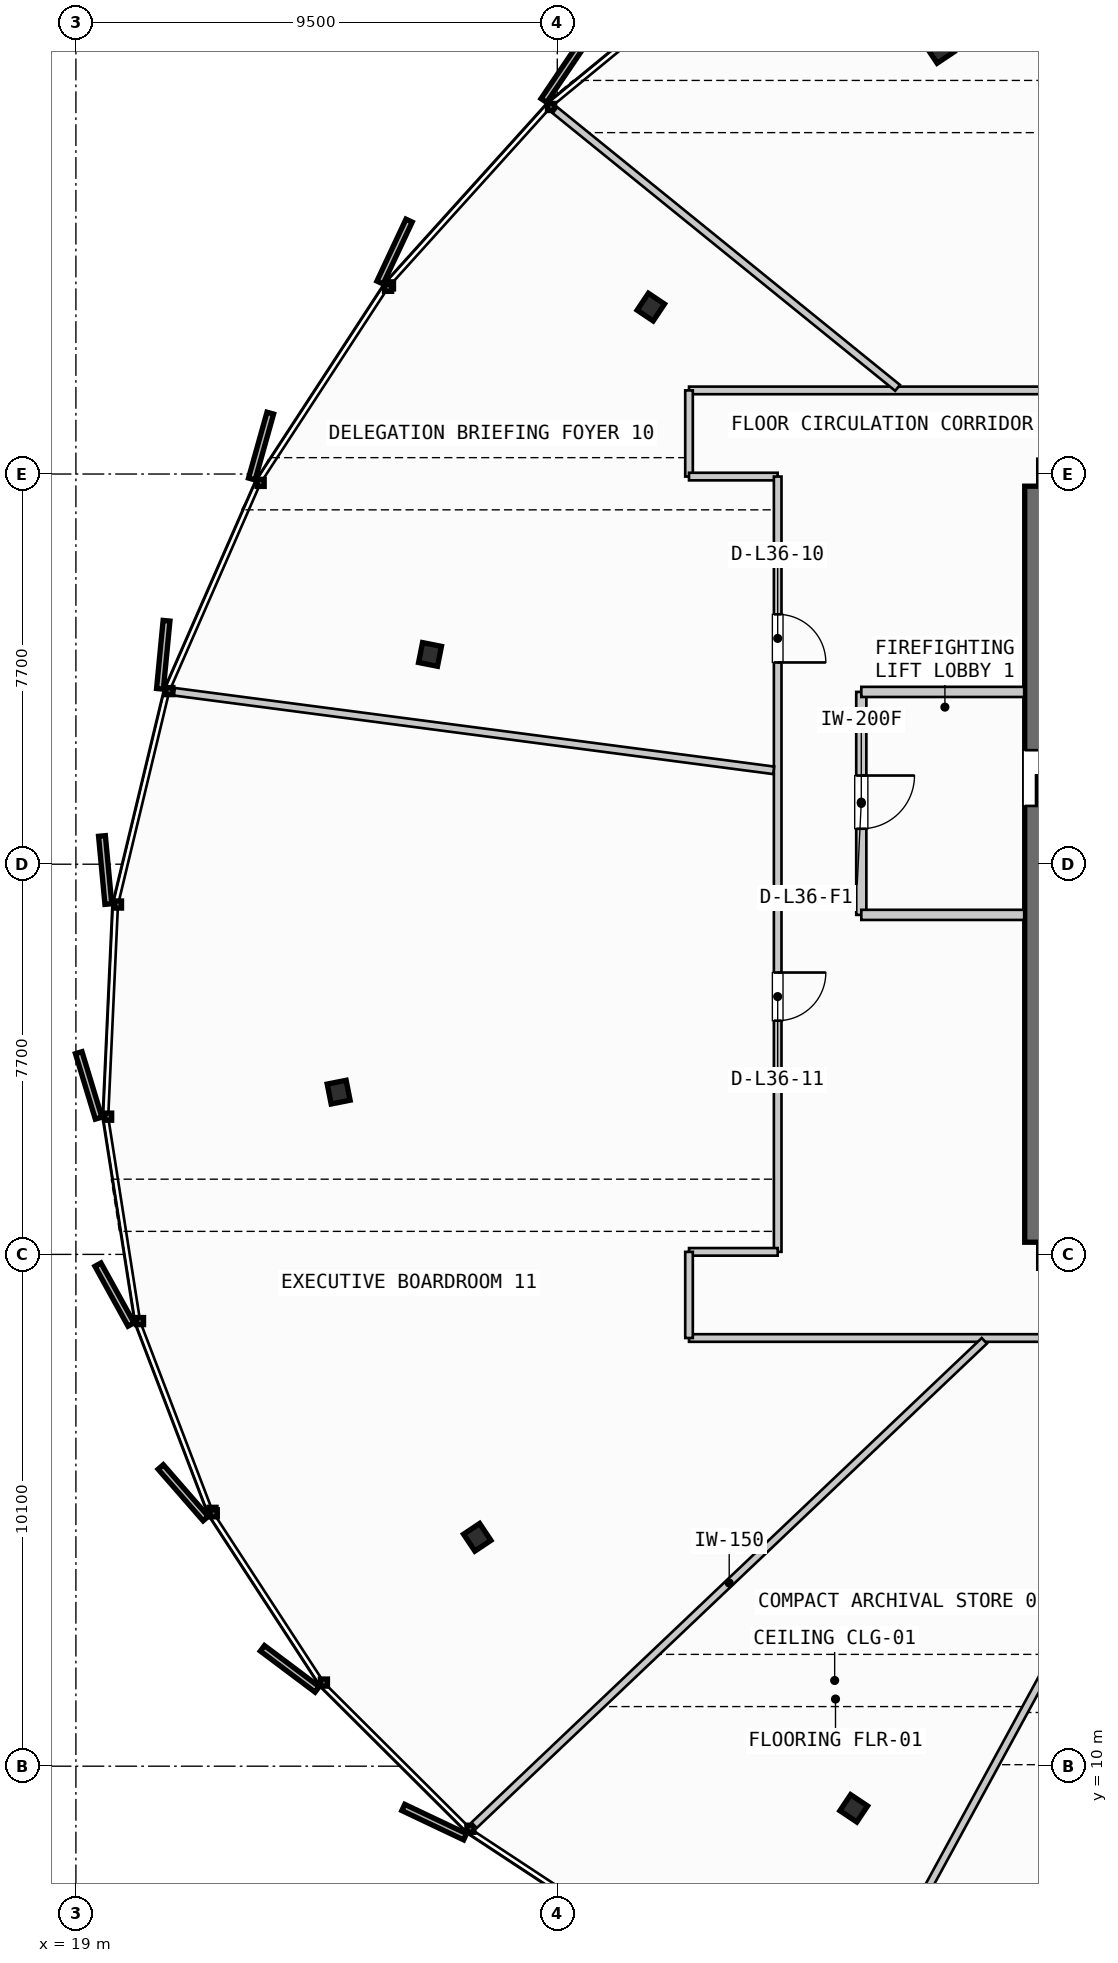
"""IFC4 building model, lengths in metres.
Left out: names, types, materials, properties, quantities, classifications, styles, units other than length and angle.
Written with IfcOpenShell. Run it as: python <this file> out.ifc"""

import sys

from ifc_helpers import new_model, si_unit, direction, frame, frame_2d, origin, origin_2d, place, context, subcontext, project, spatial, rectangle, i_section, extrude, source, transform, mapped, element, fill, save


model = new_model("IFC4")
c1 = context("Model", 3, precision=1e-05, world=origin(), true_north=direction((0.0, 1.0)))
c2 = subcontext(c1, "Body", "Model", "MODEL_VIEW")
j1 = project(units=[si_unit("LENGTHUNIT", "METRE"), si_unit("PLANEANGLEUNIT", "RADIAN")], contexts=[c1])
p1 = place(None, origin())
s1 = spatial("IfcSite", under=j1, at=p1, CompositionType="ELEMENT")
p2 = place(p1, origin())
s2 = spatial("IfcBuilding", under=s1, at=p2, CompositionType="ELEMENT")
p3 = place(p2, frame((0.0, 0.0, 143.0)))
s3 = spatial("IfcBuildingStorey", under=s2, at=p3, CompositionType="ELEMENT", Elevation=143.0)
p4 = place(p3, frame((38.0, 35.26, 0.0), z_axis=(0.0, 0.0, 1.0), x_axis=(0.0, -1.0, 0.0)))
e1 = element("IfcWall", 1, at=p4, inside=s3, PredefinedType="SHEAR", context=c2, shape_type="SweptSolid", body=[
    extrude(rectangle(XDim=14.92, YDim=0.55, at=frame_2d((7.46, 0.0))), origin(), (0.0, 0.0, 1.0), 3.3),
])
p5 = place(p4, frame((5.21, 0.0, 0.0)))
e2 = element("IfcOpeningElement", 2, at=p5, cuts=e1, PredefinedType="OPENING", context=c2, shape_type="SweptSolid", body=[
    extrude(rectangle(XDim=1.1, YDim=2.2, at=frame_2d((0.55, 1.1))), frame((0.0, 0.285, 0.0), z_axis=(0.0, -1.0, 0.0), x_axis=(1.0, 0.0, 0.0)), (0.0, 0.0, 1.0), 0.57),
])
m1 = source(origin(), c2, "Body", "SweptSolid", [
    extrude(i_section(OverallWidth=0.401, OverallDepth=0.381, WebThickness=0.032, FlangeThickness=0.051, FilletRadius=0.015, at=origin_2d()), origin(), (0.0, 0.0, 1.0), 3.3),
])
for number, where, z_axis, x_axis in (
    (3, (36.058, 43.877, 0.0), (0.0, 0.0, 1.0), (-0.556, 0.831, 0.0)),
    (4, (30.346, 38.794, 0.0), (0.0, 0.0, 1.0), (-0.831, 0.556, 0.0)),
    (5, (25.989, 31.94, 0.0), (0.0, 0.0, 1.0), (-0.981, 0.195, 0.0)),
    (6, (24.185, 23.302, 0.0), (0.0, 0.0, 1.0), (-0.981, -0.195, 0.0)),
    (7, (26.921, 14.517, 0.0), (0.0, 0.0, 1.0), (-0.831, -0.556, 0.0)),
    (8, (34.351, 9.168, 0.0), (0.0, 0.0, 1.0), (-0.556, -0.831, 0.0)),
):
    element("IfcColumn", number, at=place(p3, frame(where, z_axis=z_axis, x_axis=x_axis)), inside=s3, PredefinedType="COLUMN", context=c2, shape_type="MappedRepresentation", body=[
        mapped(m1, transform((0.0, 0.0, 0.0), scale=1.0)),
    ])
p6 = place(p3, frame((34.5, 31.2, 0.0), z_axis=(0.0, 0.0, 1.0), x_axis=(0.0, -1.0, 0.0)))
e9 = element("IfcWall", 9, at=p6, inside=s3, PredefinedType="PARTITIONING", context=c2, shape_type="SweptSolid", body=[
    extrude(rectangle(XDim=4.4, YDim=0.2, at=frame_2d((2.2, 0.0))), origin(), (0.0, 0.0, 1.0), 2.305),
])
p7 = place(p6, frame((1.65, 0.0, 0.0)))
e10 = element("IfcOpeningElement", 10, at=p7, cuts=e9, PredefinedType="OPENING", context=c2, shape_type="SweptSolid", body=[
    extrude(rectangle(XDim=1.05, YDim=2.15, at=frame_2d((0.525, 1.075))), frame((0.0, 0.11, 0.0), z_axis=(0.0, -1.0, 0.0), x_axis=(1.0, 0.0, 0.0)), (0.0, 0.0, 1.0), 0.22),
])
for number, where, z_axis, x_axis in (
    (11, (34.5, 26.8, 0.0), (0.0, 0.0, 1.0), (1.0, 0.0, 0.0)),
    (12, (34.5, 31.2, 0.0), (0.0, 0.0, 1.0), (1.0, 0.0, 0.0)),
):
    element("IfcWall", number, at=place(p3, frame(where, z_axis=z_axis, x_axis=x_axis)), inside=s3, PredefinedType="PARTITIONING", context=c2, shape_type="SweptSolid", body=[
        extrude(rectangle(XDim=3.215, YDim=0.2, at=frame_2d((1.607, 0.0))), origin(), (0.0, 0.0, 1.0), 2.305),
    ])
p8 = place(p3, frame((31.1, 18.45, 0.0), z_axis=(0.0, 0.0, 1.0), x_axis=(1.0, 0.0, 0.0)))
e13 = element("IfcWall", 13, at=p8, inside=s3, PredefinedType="PARTITIONING", context=c2, shape_type="SweptSolid", body=[
    extrude(rectangle(XDim=31.4, YDim=0.15, at=frame_2d((15.7, 0.0))), origin(), (0.0, 0.0, 1.0), 2.305),
])
p9 = place(p8, frame((7.719, 0.0, 0.0)))
e14 = element("IfcOpeningElement", 14, at=p9, cuts=e13, PredefinedType="OPENING", context=c2, shape_type="SweptSolid", body=[
    extrude(rectangle(XDim=0.95, YDim=2.15, at=frame_2d((0.475, 1.075))), frame((0.0, 0.085, 0.0), z_axis=(0.0, -1.0, 0.0), x_axis=(1.0, 0.0, 0.0)), (0.0, 0.0, 1.0), 0.17),
])
p10 = place(p8, frame((12.888, 0.0, 0.0)))
e15 = element("IfcOpeningElement", 15, at=p10, cuts=e13, PredefinedType="OPENING", context=c2, shape_type="SweptSolid", body=[
    extrude(rectangle(XDim=0.95, YDim=2.15, at=frame_2d((0.475, 1.075))), frame((0.0, 0.085, 0.0), z_axis=(0.0, -1.0, 0.0), x_axis=(1.0, 0.0, 0.0)), (0.0, 0.0, 1.0), 0.17),
])
p11 = place(p8, frame((21.415, 0.0, 0.0)))
e16 = element("IfcOpeningElement", 16, at=p11, cuts=e13, PredefinedType="OPENING", context=c2, shape_type="SweptSolid", body=[
    extrude(rectangle(XDim=0.95, YDim=2.15, at=frame_2d((0.475, 1.075))), frame((0.0, 0.085, 0.0), z_axis=(0.0, -1.0, 0.0), x_axis=(1.0, 0.0, 0.0)), (0.0, 0.0, 1.0), 0.17),
])
p12 = place(p8, frame((28.672, 0.0, 0.0)))
e17 = element("IfcOpeningElement", 17, at=p12, cuts=e13, PredefinedType="OPENING", context=c2, shape_type="SweptSolid", body=[
    extrude(rectangle(XDim=0.95, YDim=2.15, at=frame_2d((0.475, 1.075))), frame((0.0, 0.085, 0.0), z_axis=(0.0, -1.0, 0.0), x_axis=(1.0, 0.0, 0.0)), (0.0, 0.0, 1.0), 0.17),
])
p13 = place(p3, frame((62.5, 37.15, 0.0), z_axis=(0.0, 0.0, 1.0), x_axis=(-1.0, 0.0, 0.0)))
e18 = element("IfcWall", 18, at=p13, inside=s3, PredefinedType="PARTITIONING", context=c2, shape_type="SweptSolid", body=[
    extrude(rectangle(XDim=31.4, YDim=0.15, at=frame_2d((15.7, 0.0))), origin(), (0.0, 0.0, 1.0), 2.305),
])
p14 = place(p13, frame((2.56, 0.0, 0.0)))
e19 = element("IfcOpeningElement", 19, at=p14, cuts=e18, PredefinedType="OPENING", context=c2, shape_type="SweptSolid", body=[
    extrude(rectangle(XDim=0.95, YDim=2.15, at=frame_2d((0.475, 1.075))), frame((0.0, 0.085, 0.0), z_axis=(0.0, -1.0, 0.0), x_axis=(1.0, 0.0, 0.0)), (0.0, 0.0, 1.0), 0.17),
])
p15 = place(p13, frame((8.361, 0.0, 0.0)))
e20 = element("IfcOpeningElement", 20, at=p15, cuts=e18, PredefinedType="OPENING", context=c2, shape_type="SweptSolid", body=[
    extrude(rectangle(XDim=0.95, YDim=2.15, at=frame_2d((0.475, 1.075))), frame((0.0, 0.085, 0.0), z_axis=(0.0, -1.0, 0.0), x_axis=(1.0, 0.0, 0.0)), (0.0, 0.0, 1.0), 0.17),
])
p16 = place(p13, frame((14.763, 0.0, 0.0)))
e21 = element("IfcOpeningElement", 21, at=p16, cuts=e18, PredefinedType="OPENING", context=c2, shape_type="SweptSolid", body=[
    extrude(rectangle(XDim=0.95, YDim=2.15, at=frame_2d((0.475, 1.075))), frame((0.0, 0.085, 0.0), z_axis=(0.0, -1.0, 0.0), x_axis=(1.0, 0.0, 0.0)), (0.0, 0.0, 1.0), 0.17),
])
p17 = place(p13, frame((22.302, 0.0, 0.0)))
e22 = element("IfcOpeningElement", 22, at=p17, cuts=e18, PredefinedType="OPENING", context=c2, shape_type="SweptSolid", body=[
    extrude(rectangle(XDim=0.95, YDim=2.15, at=frame_2d((0.475, 1.075))), frame((0.0, 0.085, 0.0), z_axis=(0.0, -1.0, 0.0), x_axis=(1.0, 0.0, 0.0)), (0.0, 0.0, 1.0), 0.17),
])
p18 = place(p3, frame((31.1, 37.15, 0.0), z_axis=(0.0, 0.0, 1.0), x_axis=(0.0, -1.0, 0.0)))
e23 = element("IfcWall", 23, at=p18, inside=s3, PredefinedType="PARTITIONING", context=c2, shape_type="SweptSolid", body=[
    extrude(rectangle(XDim=1.7, YDim=0.15, at=frame_2d((0.85, 0.0))), origin(), (0.0, 0.0, 1.0), 2.305),
])
p19 = place(p3, frame((31.1, 35.45, 0.0), z_axis=(0.0, 0.0, 1.0), x_axis=(1.0, 0.0, 0.0)))
e24 = element("IfcWall", 24, at=p19, inside=s3, PredefinedType="PARTITIONING", context=c2, shape_type="SweptSolid", body=[
    extrude(rectangle(XDim=1.75, YDim=0.15, at=frame_2d((0.875, 0.0))), origin(), (0.0, 0.0, 1.0), 2.305),
])
p20 = place(p3, frame((32.85, 35.45, 0.0), z_axis=(0.0, 0.0, 1.0), x_axis=(0.0, -1.0, 0.0)))
e25 = element("IfcWall", 25, at=p20, inside=s3, PredefinedType="PARTITIONING", context=c2, shape_type="SweptSolid", body=[
    extrude(rectangle(XDim=15.3, YDim=0.15, at=frame_2d((7.65, 0.0))), origin(), (0.0, 0.0, 1.0), 2.305),
])
p21 = place(p20, frame((2.719, 0.0, 0.0)))
e26 = element("IfcOpeningElement", 26, at=p21, cuts=e25, PredefinedType="OPENING", context=c2, shape_type="SweptSolid", body=[
    extrude(rectangle(XDim=0.95, YDim=2.15, at=frame_2d((0.475, 1.075))), frame((0.0, 0.085, 0.0), z_axis=(0.0, -1.0, 0.0), x_axis=(1.0, 0.0, 0.0)), (0.0, 0.0, 1.0), 0.17),
])
p22 = place(p20, frame((9.788, 0.0, 0.0)))
e27 = element("IfcOpeningElement", 27, at=p22, cuts=e25, PredefinedType="OPENING", context=c2, shape_type="SweptSolid", body=[
    extrude(rectangle(XDim=0.95, YDim=2.15, at=frame_2d((0.475, 1.075))), frame((0.0, 0.085, 0.0), z_axis=(0.0, -1.0, 0.0), x_axis=(1.0, 0.0, 0.0)), (0.0, 0.0, 1.0), 0.17),
])
p23 = place(p3, frame((32.85, 20.15, 0.0), z_axis=(0.0, 0.0, 1.0), x_axis=(-1.0, 0.0, 0.0)))
e28 = element("IfcWall", 28, at=p23, inside=s3, PredefinedType="PARTITIONING", context=c2, shape_type="SweptSolid", body=[
    extrude(rectangle(XDim=1.75, YDim=0.15, at=frame_2d((0.875, 0.0))), origin(), (0.0, 0.0, 1.0), 2.305),
])
p24 = place(p3, frame((31.1, 20.15, 0.0), z_axis=(0.0, 0.0, 1.0), x_axis=(0.0, -1.0, 0.0)))
e29 = element("IfcWall", 29, at=p24, inside=s3, PredefinedType="PARTITIONING", context=c2, shape_type="SweptSolid", body=[
    extrude(rectangle(XDim=1.7, YDim=0.15, at=frame_2d((0.85, 0.0))), origin(), (0.0, 0.0, 1.0), 2.305),
])
p25 = place(p3, frame((36.928, 18.395, 0.0), z_axis=(0.0, 0.0, 1.0), x_axis=(-0.7252158145, -0.688521620865, 0.0)))
e30 = element("IfcWall", 30, at=p25, inside=s3, PredefinedType="PARTITIONING", context=c2, shape_type="SweptSolid", body=[
    extrude(rectangle(XDim=13.885, YDim=0.15, at=frame_2d((6.943, 0.0))), origin(), (0.0, 0.0, 1.0), 2.305),
])
p26 = place(p3, frame((41.69, 18.38, 0.0), z_axis=(0.0, 0.0, 1.0), x_axis=(-0.478524839703, -0.878074016121, 0.0)))
e31 = element("IfcWall", 31, at=p26, inside=s3, PredefinedType="PARTITIONING", context=c2, shape_type="SweptSolid", body=[
    extrude(rectangle(XDim=15.367, YDim=0.15, at=frame_2d((7.684, 0.0))), origin(), (0.0, 0.0, 1.0), 2.305),
])
p27 = place(p3, frame((35.216, 37.2, 0.0), z_axis=(0.0, 0.0, 1.0), x_axis=(-0.776920762639, 0.629598386736, 0.0)))
e32 = element("IfcWall", 32, at=p27, inside=s3, PredefinedType="PARTITIONING", context=c2, shape_type="SweptSolid", body=[
    extrude(rectangle(XDim=8.704, YDim=0.15, at=frame_2d((4.352, 0.0))), origin(), (0.0, 0.0, 1.0), 2.305),
])
p28 = place(p3, frame((32.771, 29.653, 0.0), z_axis=(0.0, 0.0, 1.0), x_axis=(-0.991514028733, 0.129999733947, 0.0)))
e33 = element("IfcWall", 33, at=p28, inside=s3, PredefinedType="PARTITIONING", context=c2, shape_type="SweptSolid", body=[
    extrude(rectangle(XDim=11.929, YDim=0.15, at=frame_2d((5.965, 0.0))), origin(), (0.0, 0.0, 1.0), 2.305),
])
m2 = source(origin(), c2, "Body", "SweptSolid", [
    extrude(rectangle(XDim=1.1, YDim=2.2, at=frame_2d((0.55, 1.1))), frame((0.0, 0.025, 0.0), z_axis=(0.0, -1.0, 0.0), x_axis=(1.0, 0.0, 0.0)), (0.0, 0.0, 1.0), 0.05),
])
p29 = place(p5, origin())
e34 = element("IfcDoor", 34, at=p29, inside=s3, OperationType="SLIDING_TO_LEFT", PredefinedType="DOOR", context=c2, shape_type="MappedRepresentation", body=[
    mapped(m2, transform((0.0, 0.0, 0.0), scale=1.0)),
])
fill(e2, e34)
m3 = source(origin(), c2, "Body", "SweptSolid", [
    extrude(rectangle(XDim=1.05, YDim=2.15, at=frame_2d((0.525, 1.075))), frame((0.0, 0.025, 0.0), z_axis=(0.0, -1.0, 0.0), x_axis=(1.0, 0.0, 0.0)), (0.0, 0.0, 1.0), 0.05),
])
p30 = place(p7, origin())
e35 = element("IfcDoor", 35, at=p30, inside=s3, OperationType="SINGLE_SWING_LEFT", PredefinedType="DOOR", context=c2, shape_type="MappedRepresentation", body=[
    mapped(m3, transform((0.0, 0.0, 0.0), scale=1.0)),
])
fill(e10, e35)
m4 = source(origin(), c2, "Body", "SweptSolid", [
    extrude(rectangle(XDim=0.95, YDim=2.15, at=frame_2d((0.475, 1.075))), frame((0.0, 0.025, 0.0), z_axis=(0.0, -1.0, 0.0), x_axis=(1.0, 0.0, 0.0)), (0.0, 0.0, 1.0), 0.05),
])
p31 = place(p21, origin())
e36 = element("IfcDoor", 36, at=p31, inside=s3, OperationType="SINGLE_SWING_RIGHT", PredefinedType="DOOR", context=c2, shape_type="MappedRepresentation", body=[
    mapped(m4, transform((0.0, 0.0, 0.0), scale=1.0)),
])
fill(e26, e36)
p32 = place(p22, origin())
e37 = element("IfcDoor", 37, at=p32, inside=s3, OperationType="SINGLE_SWING_LEFT", PredefinedType="DOOR", context=c2, shape_type="MappedRepresentation", body=[
    mapped(m4, transform((0.0, 0.0, 0.0), scale=1.0)),
])
fill(e27, e37)
save(model, sys.argv[1])
